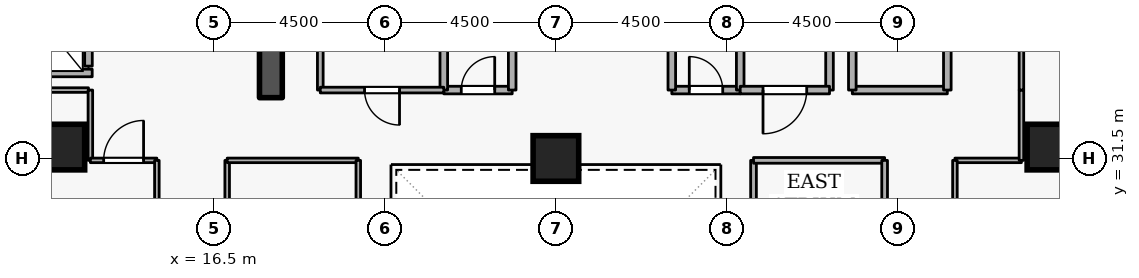
"""IFC4 building model, lengths in metres.
Left out: names, types, materials, properties, quantities, classifications, styles, units other than length and angle.
Written with IfcOpenShell. Run it as: python <this file> out.ifc"""

import sys

from ifc_helpers import new_model, si_unit, direction, frame, frame_2d, origin, origin_2d, place, context, subcontext, project, spatial, rectangle, extrude, element, fill, save


model = new_model("IFC4")
c1 = context("Model", 3, precision=1e-05, world=origin(), true_north=direction((0.0, 1.0)))
c2 = subcontext(c1, "Body", "Model", "MODEL_VIEW")
j1 = project(units=[si_unit("LENGTHUNIT", "METRE"), si_unit("PLANEANGLEUNIT", "RADIAN")], contexts=[c1])
p1 = place(None, origin())
s1 = spatial("IfcSite", under=j1, at=p1, CompositionType="ELEMENT")
p2 = place(p1, origin())
s2 = spatial("IfcBuilding", under=s1, at=p2, CompositionType="ELEMENT")
p3 = place(p2, frame((0.0, 0.0, 108.9)))
s3 = spatial("IfcBuildingStorey", under=s2, at=p3, CompositionType="ELEMENT", Elevation=108.9)
p4 = place(p3, frame((18.0, 33.1, 0.0), z_axis=(0.0, 0.0, 1.0), x_axis=(0.0, 1.0, 0.0)))
e1 = element("IfcWall", 1, at=p4, inside=s3, PredefinedType="SHEAR", context=c2, shape_type="SweptSolid", body=[
    extrude(rectangle(XDim=5.7, YDim=0.6, at=frame_2d((2.85, 0.0))), origin(), (0.0, 0.0, 1.0), 3.6),
])
for number, where, z_axis, x_axis in (
    (2, (12.5, 31.8, 0.0), (0.0, 0.0, 1.0), (1.0, 0.0, 0.0)),
    (3, (38.5, 31.8, 0.0), (0.0, 0.0, 1.0), (1.0, 0.0, 0.0)),
    (4, (25.5, 31.5, 0.0), (0.0, 0.0, 1.0), (1.0, 0.0, 0.0)),
):
    element("IfcColumn", number, at=place(p3, frame(where, z_axis=z_axis, x_axis=x_axis)), inside=s3, PredefinedType="COLUMN", context=c2, shape_type="SweptSolid", body=[
        extrude(rectangle(XDim=1.2, YDim=1.2, at=origin_2d()), origin(), (0.0, 0.0, 1.0), 3.6),
    ])
p5 = place(p3, frame((13.2, 33.93, 0.0), z_axis=(0.0, 0.0, 1.0), x_axis=(0.0, 1.0, 0.0)))
e5 = element("IfcWall", 5, at=p5, inside=s3, PredefinedType="STANDARD", context=c2, shape_type="SweptSolid", body=[
    extrude(rectangle(XDim=1.94, YDim=0.2, at=frame_2d((0.97, 0.0))), origin(), (0.0, 0.0, 1.0), 3.34),
])
p6 = place(p5, frame((0.46, 0.0, 0.0)))
e6 = element("IfcOpeningElement", 6, at=p6, cuts=e5, PredefinedType="OPENING", context=c2, shape_type="SweptSolid", body=[
    extrude(rectangle(XDim=1.02, YDim=2.06, at=frame_2d((0.51, 1.03))), frame((0.0, 0.11, 0.0), z_axis=(0.0, -1.0, 0.0), x_axis=(1.0, 0.0, 0.0)), (0.0, 0.0, 1.0), 0.22),
])
p7 = place(p3, frame((11.002, 33.75, 0.0), z_axis=(0.0, 0.0, 1.0), x_axis=(1.0, 0.0, 0.0)))
e7 = element("IfcWall", 7, at=p7, inside=s3, PredefinedType="STANDARD", context=c2, shape_type="SweptSolid", body=[
    extrude(rectangle(XDim=2.296, YDim=0.2, at=frame_2d((1.148, 0.0))), origin(), (0.0, 0.0, 1.0), 3.34),
])
p8 = place(p3, frame((33.3, 33.3, 0.0), z_axis=(0.0, 0.0, 1.0), x_axis=(1.0, 0.0, 0.0)))
e8 = element("IfcWall", 8, at=p8, inside=s3, PredefinedType="STANDARD", context=c2, shape_type="SweptSolid", body=[
    extrude(rectangle(XDim=2.5, YDim=0.2, at=frame_2d((1.25, 0.0))), origin(), (0.0, 0.0, 1.0), 3.34),
])
p9 = place(p3, frame((35.8, 33.3, 0.0), z_axis=(0.0, 0.0, 1.0), x_axis=(0.0, 1.0, 0.0)))
e9 = element("IfcWall", 9, at=p9, inside=s3, PredefinedType="STANDARD", context=c2, shape_type="SweptSolid", body=[
    extrude(rectangle(XDim=5.7, YDim=0.2, at=frame_2d((2.85, 0.0))), origin(), (0.0, 0.0, 1.0), 3.34),
])
p10 = place(p9, frame((2.275, 0.0, 0.0)))
e10 = element("IfcOpeningElement", 10, at=p10, cuts=e9, PredefinedType="OPENING", context=c2, shape_type="SweptSolid", body=[
    extrude(rectangle(XDim=1.15, YDim=2.1, at=frame_2d((0.575, 1.05))), frame((0.0, 0.11, 0.0), z_axis=(0.0, -1.0, 0.0), x_axis=(1.0, 0.0, 0.0)), (0.0, 0.0, 1.0), 0.22),
])
p11 = place(p3, frame((33.3, 35.6, 0.0), z_axis=(0.0, 0.0, 1.0), x_axis=(0.0, -1.0, 0.0)))
e11 = element("IfcWall", 11, at=p11, inside=s3, PredefinedType="STANDARD", context=c2, shape_type="SweptSolid", body=[
    extrude(rectangle(XDim=2.3, YDim=0.2, at=frame_2d((1.15, 0.0))), origin(), (0.0, 0.0, 1.0), 2.545),
])
p12 = place(p3, frame((22.55, 33.3, 0.0), z_axis=(0.0, 0.0, 1.0), x_axis=(1.0, 0.0, 0.0)))
e12 = element("IfcWall", 12, at=p12, inside=s3, PredefinedType="STANDARD", context=c2, shape_type="SweptSolid", body=[
    extrude(rectangle(XDim=1.8, YDim=0.2, at=frame_2d((0.9, 0.0))), origin(), (0.0, 0.0, 1.0), 3.34),
])
p13 = place(p12, frame((0.46, 0.0, 0.0)))
e13 = element("IfcOpeningElement", 13, at=p13, cuts=e12, PredefinedType="OPENING", context=c2, shape_type="SweptSolid", body=[
    extrude(rectangle(XDim=0.88, YDim=2.04, at=frame_2d((0.44, 1.02))), frame((0.0, 0.11, 0.0), z_axis=(0.0, -1.0, 0.0), x_axis=(1.0, 0.0, 0.0)), (0.0, 0.0, 1.0), 0.22),
])
for number, where, z_axis, x_axis in (
    (14, (24.35, 33.3, 0.0), (0.0, 0.0, 1.0), (0.0, 1.0, 0.0)),
    (15, (22.55, 35.35, 0.0), (0.0, 0.0, 1.0), (0.0, -1.0, 0.0)),
):
    element("IfcWall", number, at=place(p3, frame(where, z_axis=z_axis, x_axis=x_axis)), inside=s3, PredefinedType="STANDARD", context=c2, shape_type="SweptSolid", body=[
        extrude(rectangle(XDim=2.05, YDim=0.2, at=frame_2d((1.025, 0.0))), origin(), (0.0, 0.0, 1.0), 3.34),
    ])
p14 = place(p3, frame((28.55, 33.3, 0.0), z_axis=(0.0, 0.0, 1.0), x_axis=(1.0, 0.0, 0.0)))
e16 = element("IfcWall", 16, at=p14, inside=s3, PredefinedType="STANDARD", context=c2, shape_type="SweptSolid", body=[
    extrude(rectangle(XDim=1.8, YDim=0.2, at=frame_2d((0.9, 0.0))), origin(), (0.0, 0.0, 1.0), 3.34),
])
p15 = place(p14, frame((0.46, 0.0, 0.0)))
e17 = element("IfcOpeningElement", 17, at=p15, cuts=e16, PredefinedType="OPENING", context=c2, shape_type="SweptSolid", body=[
    extrude(rectangle(XDim=0.88, YDim=2.04, at=frame_2d((0.44, 1.02))), frame((0.0, 0.11, 0.0), z_axis=(0.0, -1.0, 0.0), x_axis=(1.0, 0.0, 0.0)), (0.0, 0.0, 1.0), 0.22),
])
for number, where, z_axis, x_axis in (
    (18, (30.35, 33.3, 0.0), (0.0, 0.0, 1.0), (0.0, 1.0, 0.0)),
    (19, (28.55, 35.35, 0.0), (0.0, 0.0, 1.0), (0.0, -1.0, 0.0)),
):
    element("IfcWall", number, at=place(p3, frame(where, z_axis=z_axis, x_axis=x_axis)), inside=s3, PredefinedType="STANDARD", context=c2, shape_type="SweptSolid", body=[
        extrude(rectangle(XDim=2.05, YDim=0.2, at=frame_2d((1.025, 0.0))), origin(), (0.0, 0.0, 1.0), 3.34),
    ])
p16 = place(p3, frame((32.7, 35.35, 0.0), z_axis=(0.0, 0.0, 1.0), x_axis=(0.0, -1.0, 0.0)))
e20 = element("IfcWall", 20, at=p16, inside=s3, PredefinedType="STANDARD", context=c2, shape_type="SweptSolid", body=[
    extrude(rectangle(XDim=2.05, YDim=0.2, at=frame_2d((1.025, 0.0))), origin(), (0.0, 0.0, 1.0), 2.545),
])
p17 = place(p3, frame((32.7, 33.3, 0.0), z_axis=(0.0, 0.0, 1.0), x_axis=(-1.0, 0.0, 0.0)))
e21 = element("IfcWall", 21, at=p17, inside=s3, PredefinedType="STANDARD", context=c2, shape_type="SweptSolid", body=[
    extrude(rectangle(XDim=2.35, YDim=0.2, at=frame_2d((1.175, 0.0))), origin(), (0.0, 0.0, 1.0), 3.34),
])
p18 = place(p17, frame((0.6, 0.0, 0.0)))
e22 = element("IfcOpeningElement", 22, at=p18, cuts=e21, PredefinedType="OPENING", context=c2, shape_type="SweptSolid", body=[
    extrude(rectangle(XDim=1.15, YDim=2.1, at=frame_2d((0.575, 1.05))), frame((0.0, 0.11, 0.0), z_axis=(0.0, -1.0, 0.0), x_axis=(1.0, 0.0, 0.0)), (0.0, 0.0, 1.0), 0.22),
])
p19 = place(p3, frame((19.3, 33.3, 0.0), z_axis=(0.0, 0.0, 1.0), x_axis=(0.0, 1.0, 0.0)))
e23 = element("IfcWall", 23, at=p19, inside=s3, PredefinedType="PARTITIONING", context=c2, shape_type="SweptSolid", body=[
    extrude(rectangle(XDim=2.05, YDim=0.15, at=frame_2d((1.025, 0.0))), origin(), (0.0, 0.0, 1.0), 3.34),
])
p20 = place(p3, frame((22.55, 33.3, 0.0), z_axis=(0.0, 0.0, 1.0), x_axis=(-1.0, 0.0, 0.0)))
e24 = element("IfcWall", 24, at=p20, inside=s3, PredefinedType="PARTITIONING", context=c2, shape_type="SweptSolid", body=[
    extrude(rectangle(XDim=3.25, YDim=0.15, at=frame_2d((1.625, 0.0))), origin(), (0.0, 0.0, 1.0), 3.34),
])
p21 = place(p20, frame((1.165, 0.0, 0.0)))
e25 = element("IfcOpeningElement", 25, at=p21, cuts=e24, PredefinedType="OPENING", context=c2, shape_type="SweptSolid", body=[
    extrude(rectangle(XDim=0.92, YDim=2.08, at=frame_2d((0.46, 1.04))), frame((0.0, 0.085, 0.0), z_axis=(0.0, -1.0, 0.0), x_axis=(1.0, 0.0, 0.0)), (0.0, 0.0, 1.0), 0.17),
])
p22 = place(p3, frame((10.9, 33.3, 0.0), z_axis=(0.0, 0.0, 1.0), x_axis=(1.0, 0.0, 0.0)))
e26 = element("IfcWall", 26, at=p22, inside=s3, PredefinedType="PARTITIONING", context=c2, shape_type="SweptSolid", body=[
    extrude(rectangle(XDim=2.3, YDim=0.12, at=frame_2d((1.15, 0.0))), origin(), (0.0, 0.0, 1.0), 3.34),
])
p23 = place(p3, frame((13.25, 33.3, 0.0), z_axis=(0.0, 0.0, 1.0), x_axis=(0.0, -1.0, 0.0)))
e27 = element("IfcWall", 27, at=p23, inside=s3, PredefinedType="PARTITIONING", context=c2, shape_type="SweptSolid", body=[
    extrude(rectangle(XDim=1.85, YDim=0.12, at=frame_2d((0.925, 0.0))), origin(), (0.0, 0.0, 1.0), 3.34),
])
p24 = place(p3, frame((13.25, 31.45, 0.0), z_axis=(0.0, 0.0, 1.0), x_axis=(1.0, 0.0, 0.0)))
e28 = element("IfcWall", 28, at=p24, inside=s3, PredefinedType="PARTITIONING", context=c2, shape_type="SweptSolid", body=[
    extrude(rectangle(XDim=1.75, YDim=0.12, at=frame_2d((0.875, 0.0))), origin(), (0.0, 0.0, 1.0), 3.34),
])
p25 = place(p24, frame((0.35, 0.0, 0.0)))
e29 = element("IfcOpeningElement", 29, at=p25, cuts=e28, PredefinedType="OPENING", context=c2, shape_type="SweptSolid", body=[
    extrude(rectangle(XDim=1.05, YDim=2.1, at=frame_2d((0.525, 1.05))), frame((0.0, 0.07, 0.0), z_axis=(0.0, -1.0, 0.0), x_axis=(1.0, 0.0, 0.0)), (0.0, 0.0, 1.0), 0.14),
])
p26 = place(p3, frame((15.0, 31.45, 0.0), z_axis=(0.0, 0.0, 1.0), x_axis=(0.0, -1.0, 0.0)))
e30 = element("IfcWall", 30, at=p26, inside=s3, PredefinedType="PARTITIONING", context=c2, shape_type="SweptSolid", body=[
    extrude(rectangle(XDim=1.3, YDim=0.12, at=frame_2d((0.65, 0.0))), origin(), (0.0, 0.0, 1.0), 3.34),
])
p27 = place(p3, frame((36.0, 31.45, 0.0), z_axis=(0.0, 0.0, 1.0), x_axis=(1.0, 0.0, 0.0)))
e31 = element("IfcWall", 31, at=p27, inside=s3, PredefinedType="PARTITIONING", context=c2, shape_type="SweptSolid", body=[
    extrude(rectangle(XDim=1.75, YDim=0.12, at=frame_2d((0.875, 0.0))), origin(), (0.0, 0.0, 1.0), 3.34),
])
p28 = place(p3, frame((37.75, 31.45, 0.0), z_axis=(0.0, 0.0, 1.0), x_axis=(0.0, 1.0, 0.0)))
e32 = element("IfcWall", 32, at=p28, inside=s3, PredefinedType="PARTITIONING", context=c2, shape_type="SweptSolid", body=[
    extrude(rectangle(XDim=1.85, YDim=0.12, at=frame_2d((0.925, 0.0))), origin(), (0.0, 0.0, 1.0), 3.34),
])
p29 = place(p3, frame((37.75, 33.3, 0.0), z_axis=(0.0, 0.0, 1.0), x_axis=(0.0, 1.0, 0.0)))
e33 = element("IfcWall", 33, at=p29, inside=s3, PredefinedType="PARTITIONING", context=c2, shape_type="SweptSolid", body=[
    extrude(rectangle(XDim=9.35, YDim=0.12, at=frame_2d((4.675, 0.0))), origin(), (0.0, 0.0, 1.0), 3.34),
])
p30 = place(p29, frame((4.2, 0.0, 0.0)))
e34 = element("IfcOpeningElement", 34, at=p30, cuts=e33, PredefinedType="OPENING", context=c2, shape_type="SweptSolid", body=[
    extrude(rectangle(XDim=0.95, YDim=2.1, at=frame_2d((0.475, 1.05))), frame((0.0, 0.07, 0.0), z_axis=(0.0, -1.0, 0.0), x_axis=(1.0, 0.0, 0.0)), (0.0, 0.0, 1.0), 0.14),
])
p31 = place(p3, frame((36.0, 30.15, 0.0), z_axis=(0.0, 0.0, 1.0), x_axis=(0.0, 1.0, 0.0)))
e35 = element("IfcWall", 35, at=p31, inside=s3, PredefinedType="PARTITIONING", context=c2, shape_type="SweptSolid", body=[
    extrude(rectangle(XDim=1.3, YDim=0.12, at=frame_2d((0.65, 0.0))), origin(), (0.0, 0.0, 1.0), 3.34),
])
p32 = place(p3, frame((30.7, 22.55, 0.0), z_axis=(0.0, 0.0, 1.0), x_axis=(0.0, 1.0, 0.0)))
e36 = element("IfcWall", 36, at=p32, inside=s3, PredefinedType="PARTITIONING", context=c2, shape_type="SweptSolid", body=[
    extrude(rectangle(XDim=8.9, YDim=0.15, at=frame_2d((4.45, 0.0))), origin(), (0.0, 0.0, 1.0), 3.34),
])
p33 = place(p3, frame((30.7, 31.45, 0.0), z_axis=(0.0, 0.0, 1.0), x_axis=(1.0, 0.0, 0.0)))
e37 = element("IfcWall", 37, at=p33, inside=s3, PredefinedType="PARTITIONING", context=c2, shape_type="SweptSolid", body=[
    extrude(rectangle(XDim=3.45, YDim=0.15, at=frame_2d((1.725, 0.0))), origin(), (0.0, 0.0, 1.0), 3.34),
])
p34 = place(p3, frame((34.15, 31.45, 0.0), z_axis=(0.0, 0.0, 1.0), x_axis=(0.0, -1.0, 0.0)))
e38 = element("IfcWall", 38, at=p34, inside=s3, PredefinedType="PARTITIONING", context=c2, shape_type="SweptSolid", body=[
    extrude(rectangle(XDim=8.9, YDim=0.15, at=frame_2d((4.45, 0.0))), origin(), (0.0, 0.0, 1.0), 3.34),
])
p35 = place(p34, frame((3.8, 0.0, 0.0)))
e39 = element("IfcOpeningElement", 39, at=p35, cuts=e38, PredefinedType="OPENING", context=c2, shape_type="SweptSolid", body=[
    extrude(rectangle(XDim=1.3, YDim=2.12, at=frame_2d((0.65, 1.06))), frame((0.0, 0.085, 0.0), z_axis=(0.0, -1.0, 0.0), x_axis=(1.0, 0.0, 0.0)), (0.0, 0.0, 1.0), 0.17),
])
p36 = place(p3, frame((16.85, 22.55, 0.0), z_axis=(0.0, 0.0, 1.0), x_axis=(0.0, 1.0, 0.0)))
e40 = element("IfcWall", 40, at=p36, inside=s3, PredefinedType="PARTITIONING", context=c2, shape_type="SweptSolid", body=[
    extrude(rectangle(XDim=8.9, YDim=0.12, at=frame_2d((4.45, 0.0))), origin(), (0.0, 0.0, 1.0), 3.34),
])
p37 = place(p36, frame((3.975, 0.0, 0.0)))
e41 = element("IfcOpeningElement", 41, at=p37, cuts=e40, PredefinedType="OPENING", context=c2, shape_type="SweptSolid", body=[
    extrude(rectangle(XDim=0.95, YDim=2.1, at=frame_2d((0.475, 1.05))), frame((0.0, 0.07, 0.0), z_axis=(0.0, -1.0, 0.0), x_axis=(1.0, 0.0, 0.0)), (0.0, 0.0, 1.0), 0.14),
])
p38 = place(p3, frame((16.85, 31.45, 0.0), z_axis=(0.0, 0.0, 1.0), x_axis=(1.0, 0.0, 0.0)))
e42 = element("IfcWall", 42, at=p38, inside=s3, PredefinedType="PARTITIONING", context=c2, shape_type="SweptSolid", body=[
    extrude(rectangle(XDim=3.45, YDim=0.12, at=frame_2d((1.725, 0.0))), origin(), (0.0, 0.0, 1.0), 3.34),
])
p39 = place(p3, frame((20.3, 31.45, 0.0), z_axis=(0.0, 0.0, 1.0), x_axis=(0.0, -1.0, 0.0)))
e43 = element("IfcWall", 43, at=p39, inside=s3, PredefinedType="PARTITIONING", context=c2, shape_type="SweptSolid", body=[
    extrude(rectangle(XDim=8.9, YDim=0.12, at=frame_2d((4.45, 0.0))), origin(), (0.0, 0.0, 1.0), 3.34),
])
p40 = place(p13, origin())
e44 = element("IfcDoor", 44, at=p40, inside=s3, OperationType="SINGLE_SWING_RIGHT", PredefinedType="DOOR", context=c2, shape_type="SweptSolid", body=[
    extrude(rectangle(XDim=0.88, YDim=2.04, at=frame_2d((0.44, 1.02))), frame((0.0, 0.025, 0.0), z_axis=(0.0, -1.0, 0.0), x_axis=(1.0, 0.0, 0.0)), (0.0, 0.0, 1.0), 0.05),
])
fill(e13, e44)
p41 = place(p15, origin())
e45 = element("IfcDoor", 45, at=p41, inside=s3, OperationType="SINGLE_SWING_LEFT", PredefinedType="DOOR", context=c2, shape_type="SweptSolid", body=[
    extrude(rectangle(XDim=0.88, YDim=2.04, at=frame_2d((0.44, 1.02))), frame((0.0, 0.025, 0.0), z_axis=(0.0, -1.0, 0.0), x_axis=(1.0, 0.0, 0.0)), (0.0, 0.0, 1.0), 0.05),
])
fill(e17, e45)
p42 = place(p21, origin())
e46 = element("IfcDoor", 46, at=p42, inside=s3, OperationType="SINGLE_SWING_LEFT", PredefinedType="DOOR", context=c2, shape_type="SweptSolid", body=[
    extrude(rectangle(XDim=0.92, YDim=2.08, at=frame_2d((0.46, 1.04))), frame((0.0, 0.025, 0.0), z_axis=(0.0, -1.0, 0.0), x_axis=(1.0, 0.0, 0.0)), (0.0, 0.0, 1.0), 0.05),
])
fill(e25, e46)
p43 = place(p18, origin())
e47 = element("IfcDoor", 47, at=p43, inside=s3, OperationType="SINGLE_SWING_RIGHT", PredefinedType="DOOR", context=c2, shape_type="SweptSolid", body=[
    extrude(rectangle(XDim=1.15, YDim=2.1, at=frame_2d((0.575, 1.05))), frame((0.0, 0.025, 0.0), z_axis=(0.0, -1.0, 0.0), x_axis=(1.0, 0.0, 0.0)), (0.0, 0.0, 1.0), 0.05),
])
fill(e22, e47)
p44 = place(p25, origin())
e48 = element("IfcDoor", 48, at=p44, inside=s3, OperationType="SINGLE_SWING_RIGHT", PredefinedType="DOOR", context=c2, shape_type="SweptSolid", body=[
    extrude(rectangle(XDim=1.05, YDim=2.1, at=frame_2d((0.525, 1.05))), frame((0.0, 0.025, 0.0), z_axis=(0.0, -1.0, 0.0), x_axis=(1.0, 0.0, 0.0)), (0.0, 0.0, 1.0), 0.05),
])
fill(e29, e48)
save(model, sys.argv[1])
